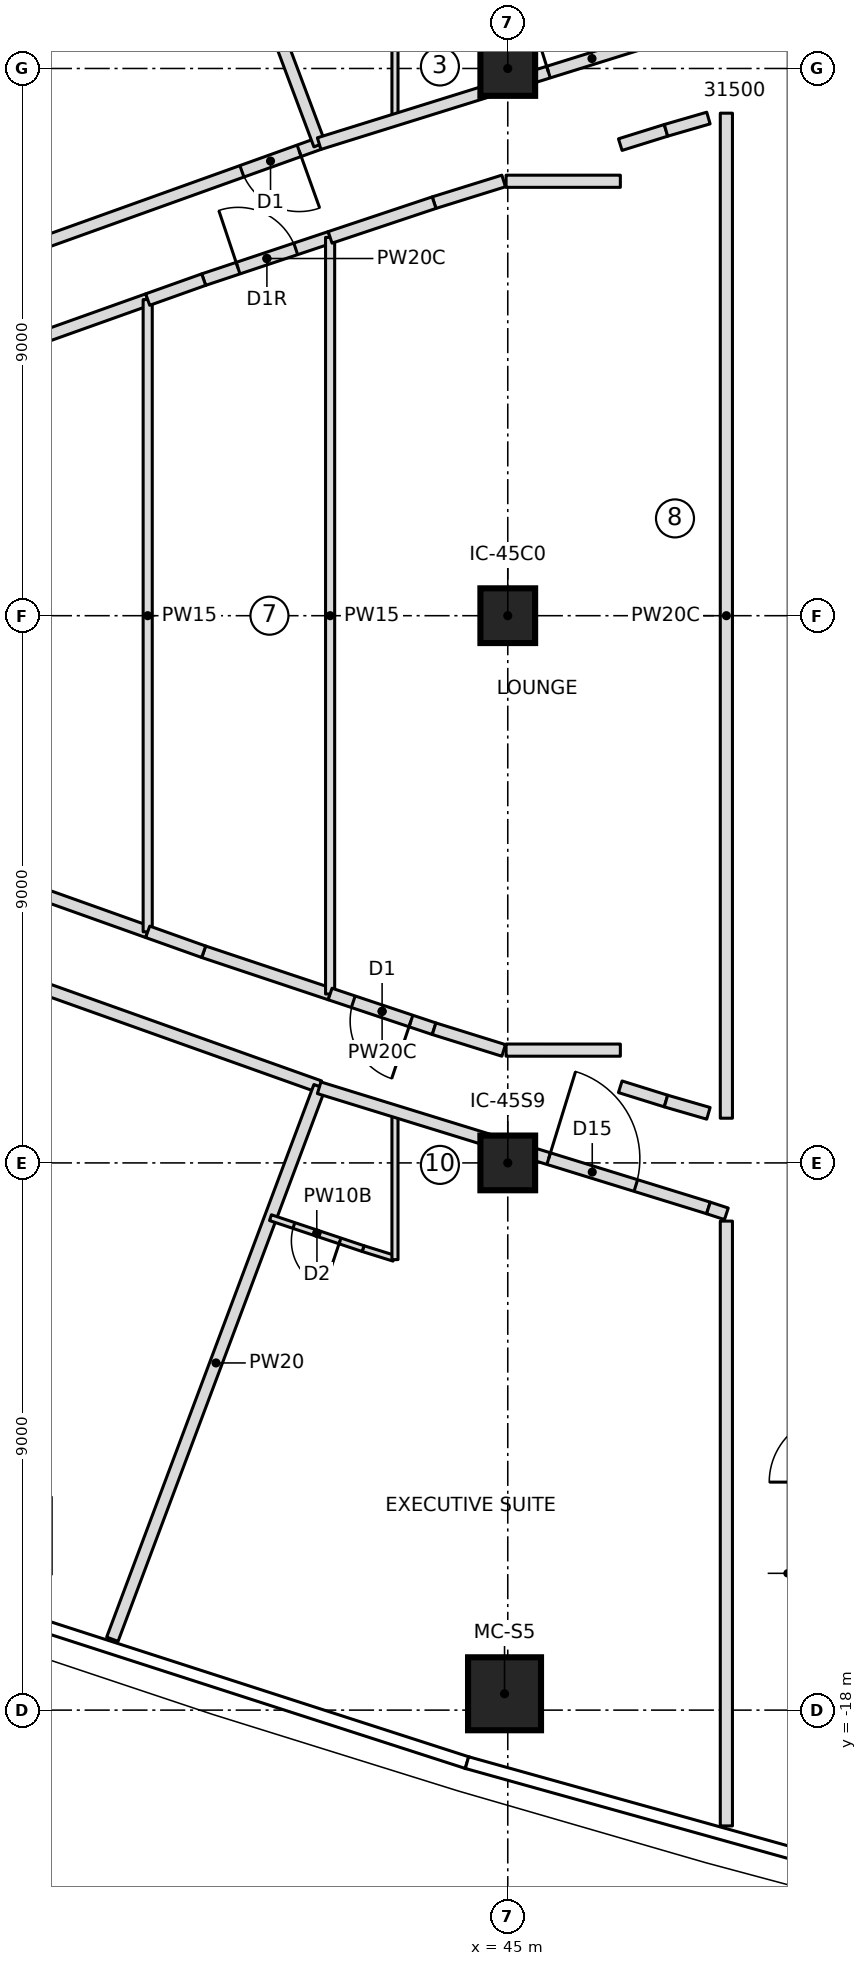
"""IFC4 building model, lengths in metres.
Left out: names, types, materials, properties, quantities, classifications, styles, units other than length and angle.
Written with IfcOpenShell. Run it as: python <this file> out.ifc"""

import sys

from ifc_helpers import new_model, si_unit, direction, frame, frame_2d, origin, origin_2d, place, context, subcontext, project, spatial, rectangle, extrude, element, fill, save


model = new_model("IFC4")
c1 = context("Model", 3, precision=1e-05, world=origin(), true_north=direction((0.0, 1.0)))
c2 = subcontext(c1, "Body", "Model", "MODEL_VIEW")
j1 = project(units=[si_unit("LENGTHUNIT", "METRE"), si_unit("PLANEANGLEUNIT", "RADIAN")], contexts=[c1])
p1 = place(None, origin())
s1 = spatial("IfcSite", under=j1, at=p1, CompositionType="ELEMENT")
p2 = place(p1, origin())
s2 = spatial("IfcBuilding", under=s1, at=p2, CompositionType="ELEMENT")
p3 = place(p2, frame((0.0, 0.0, 235.0)))
s3 = spatial("IfcBuildingStorey", under=s2, at=p3, CompositionType="ELEMENT", Elevation=235.0)
p4 = place(p3, frame((44.947, -17.731, 0.0), z_axis=(0.0, 0.0, 1.0), x_axis=(1.0, 0.0, 0.0)))
e1 = element("IfcColumn", 1, at=p4, inside=s3, PredefinedType="COLUMN", context=c2, shape_type="SweptSolid", body=[
    extrude(rectangle(XDim=1.2, YDim=1.2, at=origin_2d()), origin(), (0.0, 0.0, 1.0), 3.55),
])
for number, where, z_axis, x_axis in (
    (2, (45.0, -9.0, 0.0), (0.0, 0.0, 1.0), (1.0, 0.0, 0.0)),
    (3, (45.0, 0.0, 0.0), (0.0, 0.0, 1.0), (1.0, 0.0, 0.0)),
    (4, (45.0, 9.0, 0.0), (0.0, 0.0, 1.0), (1.0, 0.0, 0.0)),
):
    element("IfcColumn", number, at=place(p3, frame(where, z_axis=z_axis, x_axis=x_axis)), inside=s3, PredefinedType="COLUMN", context=c2, shape_type="SweptSolid", body=[
        extrude(rectangle(XDim=0.9, YDim=0.9, at=origin_2d()), origin(), (0.0, 0.0, 1.0), 3.55),
    ])
p5 = place(p3, frame((41.898, 7.764, 0.0), z_axis=(0.0, 0.0, 1.0), x_axis=(-0.941277643829, -0.337633525034, 0.0)))
e5 = element("IfcWall", 5, at=p5, inside=s3, PredefinedType="PARTITIONING", context=c2, shape_type="SweptSolid", body=[
    extrude(rectangle(XDim=10.001, YDim=0.2, at=frame_2d((5.0, 0.0))), origin(), (0.0, 0.0, 1.0), 3.25),
])
p6 = place(p5, frame((0.35, 0.0, 0.0)))
e6 = element("IfcOpeningElement", 6, at=p6, cuts=e5, PredefinedType="OPENING", context=c2, shape_type="SweptSolid", body=[
    extrude(rectangle(XDim=1.0, YDim=2.1, at=frame_2d((0.5, 1.05))), frame((0.0, 0.11, 0.0), z_axis=(0.0, -1.0, 0.0), x_axis=(1.0, 0.0, 0.0)), (0.0, 0.0, 1.0), 0.22),
])
p7 = place(p3, frame((41.906, 7.746, 0.0), z_axis=(0.0, 0.0, 1.0), x_axis=(-0.35112895446, 0.936327110224, 0.0)))
e7 = element("IfcWall", 7, at=p7, inside=s3, PredefinedType="PARTITIONING", context=c2, shape_type="SweptSolid", body=[
    extrude(rectangle(XDim=9.706, YDim=0.2, at=frame_2d((4.853, 0.0))), origin(), (0.0, 0.0, 1.0), 3.25),
])
p8 = place(p3, frame((32.485, -4.388, 0.0), z_axis=(0.0, 0.0, 1.0), x_axis=(0.941953797829, -0.335742524498, 0.0)))
e8 = element("IfcWall", 8, at=p8, inside=s3, PredefinedType="PARTITIONING", context=c2, shape_type="SweptSolid", body=[
    extrude(rectangle(XDim=10.001, YDim=0.2, at=frame_2d((5.001, 0.0))), origin(), (0.0, 0.0, 1.0), 3.25),
])
p9 = place(p8, frame((3.7, 0.0, 0.0)))
e9 = element("IfcOpeningElement", 9, at=p9, cuts=e8, PredefinedType="OPENING", context=c2, shape_type="SweptSolid", body=[
    extrude(rectangle(XDim=1.0, YDim=2.1, at=frame_2d((0.5, 1.05))), frame((0.0, 0.11, 0.0), z_axis=(0.0, -1.0, 0.0), x_axis=(1.0, 0.0, 0.0)), (0.0, 0.0, 1.0), 0.22),
])
p10 = place(p3, frame((38.497, -16.834, 0.0), z_axis=(0.0, 0.0, 1.0), x_axis=(0.35112895446, 0.936327110224, 0.0)))
e10 = element("IfcWall", 10, at=p10, inside=s3, PredefinedType="PARTITIONING", context=c2, shape_type="SweptSolid", body=[
    extrude(rectangle(XDim=9.706, YDim=0.2, at=frame_2d((4.853, 0.0))), origin(), (0.0, 0.0, 1.0), 3.25),
])
p11 = place(p3, frame((43.128, -10.568, 0.0), z_axis=(0.0, 0.0, 1.0), x_axis=(-0.954618903587, 0.297830067176, 0.0)))
e11 = element("IfcWall", 11, at=p11, inside=s3, PredefinedType="PARTITIONING", context=c2, shape_type="SweptSolid", body=[
    extrude(rectangle(XDim=0.531, YDim=0.1, at=frame_2d((0.266, 0.0))), origin(), (0.0, 0.0, 1.0), 3.25),
])
p12 = place(p3, frame((42.621, -10.409, 0.0), z_axis=(0.0, 0.0, 1.0), x_axis=(-0.948485479965, 0.3168206027, 0.0)))
e12 = element("IfcWall", 12, at=p12, inside=s3, PredefinedType="PARTITIONING", context=c2, shape_type="SweptSolid", body=[
    extrude(rectangle(XDim=1.606, YDim=0.1, at=frame_2d((0.803, 0.0))), origin(), (0.0, 0.0, 1.0), 3.25),
])
p13 = place(p12, frame((0.4, 0.0, 0.0)))
e13 = element("IfcOpeningElement", 13, at=p13, cuts=e12, PredefinedType="OPENING", context=c2, shape_type="SweptSolid", body=[
    extrude(rectangle(XDim=0.8, YDim=2.1, at=frame_2d((0.4, 1.05))), frame((0.0, 0.06, 0.0), z_axis=(0.0, -1.0, 0.0), x_axis=(1.0, 0.0, 0.0)), (0.0, 0.0, 1.0), 0.12),
])
for number, where, z_axis, x_axis in (
    (14, (39.078, -5.199, 0.0), (0.0, 0.0, 1.0), (-0.942, 0.336, 0.0)),
    (15, (36.236, 4.186, 0.0), (0.0, 0.0, 1.0), (0.942, 0.336, 0.0)),
):
    element("IfcWall", number, at=place(p3, frame(where, z_axis=z_axis, x_axis=x_axis)), inside=s3, PredefinedType="PARTITIONING", context=c2, shape_type="SweptSolid", body=[
        extrude(rectangle(XDim=3.017, YDim=0.2, at=frame_2d((1.509, 0.0))), origin(), (0.0, 0.0, 1.0), 3.25),
    ])
p14 = place(p3, frame((39.078, -5.199, 0.0), z_axis=(0.0, 0.0, 1.0), x_axis=(0.0, 1.0, 0.0)))
e16 = element("IfcWall", 16, at=p14, inside=s3, PredefinedType="PARTITIONING", context=c2, shape_type="SweptSolid", body=[
    extrude(rectangle(XDim=10.398, YDim=0.15, at=frame_2d((5.199, 0.0))), origin(), (0.0, 0.0, 1.0), 3.25),
])
p15 = place(p3, frame((39.999, 5.527, 0.0), z_axis=(0.0, 0.0, 1.0), x_axis=(0.9484714727, 0.316862534034, 0.0)))
e17 = element("IfcWall", 17, at=p15, inside=s3, PredefinedType="PARTITIONING", context=c2, shape_type="SweptSolid", body=[
    extrude(rectangle(XDim=2.192, YDim=0.2, at=frame_2d((1.096, 0.0))), origin(), (0.0, 0.0, 1.0), 3.25),
])
p16 = place(p15, frame((0.596, 0.0, 0.0)))
e18 = element("IfcOpeningElement", 18, at=p16, cuts=e17, PredefinedType="OPENING", context=c2, shape_type="SweptSolid", body=[
    extrude(rectangle(XDim=1.0, YDim=2.1, at=frame_2d((0.5, 1.05))), frame((0.0, 0.11, 0.0), z_axis=(0.0, -1.0, 0.0), x_axis=(1.0, 0.0, 0.0)), (0.0, 0.0, 1.0), 0.22),
])
p17 = place(p3, frame((42.078, -6.222, 0.0), z_axis=(0.0, 0.0, 1.0), x_axis=(-0.9484714727, 0.316862534034, 0.0)))
e19 = element("IfcWall", 19, at=p17, inside=s3, PredefinedType="PARTITIONING", context=c2, shape_type="SweptSolid", body=[
    extrude(rectangle(XDim=2.192, YDim=0.2, at=frame_2d((1.096, 0.0))), origin(), (0.0, 0.0, 1.0), 3.25),
])
for number, where, z_axis, x_axis in (
    (20, (39.999, -5.527, 0.0), (0.0, 0.0, 1.0), (-0.942, 0.336, 0.0)),
    (21, (39.078, 5.199, 0.0), (0.0, 0.0, 1.0), (0.942, 0.336, 0.0)),
):
    element("IfcWall", number, at=place(p3, frame(where, z_axis=z_axis, x_axis=x_axis)), inside=s3, PredefinedType="PARTITIONING", context=c2, shape_type="SweptSolid", body=[
        extrude(rectangle(XDim=0.978, YDim=0.2, at=frame_2d((0.489, 0.0))), origin(), (0.0, 0.0, 1.0), 3.25),
    ])
p18 = place(p3, frame((42.078, -6.222, 0.0), z_axis=(0.0, 0.0, 1.0), x_axis=(0.0, 1.0, 0.0)))
e22 = element("IfcWall", 22, at=p18, inside=s3, PredefinedType="PARTITIONING", context=c2, shape_type="SweptSolid", body=[
    extrude(rectangle(XDim=12.444, YDim=0.15, at=frame_2d((6.222, 0.0))), origin(), (0.0, 0.0, 1.0), 3.25),
])
p19 = place(p3, frame((43.788, -6.793, 0.0), z_axis=(0.0, 0.0, 1.0), x_axis=(-0.948466406859, 0.316877697323, 0.0)))
e23 = element("IfcWall", 23, at=p19, inside=s3, PredefinedType="PARTITIONING", context=c2, shape_type="SweptSolid", body=[
    extrude(rectangle(XDim=1.803, YDim=0.2, at=frame_2d((0.901, 0.0))), origin(), (0.0, 0.0, 1.0), 3.25),
])
p20 = place(p19, frame((0.402, 0.0, 0.0)))
e24 = element("IfcOpeningElement", 24, at=p20, cuts=e23, PredefinedType="OPENING", context=c2, shape_type="SweptSolid", body=[
    extrude(rectangle(XDim=1.0, YDim=2.1, at=frame_2d((0.5, 1.05))), frame((0.0, 0.11, 0.0), z_axis=(0.0, -1.0, 0.0), x_axis=(1.0, 0.0, 0.0)), (0.0, 0.0, 1.0), 0.22),
])
p21 = place(p3, frame((43.788, 6.793, 0.0), z_axis=(0.0, 0.0, 1.0), x_axis=(0.954693570678, 0.29759063511, 0.0)))
e25 = element("IfcWall", 25, at=p21, inside=s3, PredefinedType="PARTITIONING", context=c2, shape_type="SweptSolid", body=[
    extrude(rectangle(XDim=1.198, YDim=0.2, at=frame_2d((0.599, 0.0))), origin(), (0.0, 0.0, 1.0), 3.25),
])
for number, where, z_axis, x_axis in (
    (26, (46.85, 7.748, 0.0), (0.0, 0.0, 1.0), (0.955, 0.298, 0.0)),
    (27, (47.602, -7.982, 0.0), (0.0, 0.0, 1.0), (-0.955, 0.298, 0.0)),
):
    element("IfcWall", number, at=place(p3, frame(where, z_axis=z_axis, x_axis=x_axis)), inside=s3, PredefinedType="PARTITIONING", context=c2, shape_type="SweptSolid", body=[
        extrude(rectangle(XDim=0.788, YDim=0.2, at=frame_2d((0.394, 0.0))), origin(), (0.0, 0.0, 1.0), 3.25),
    ])
p22 = place(p3, frame((44.933, -7.15, 0.0), z_axis=(0.0, 0.0, 1.0), x_axis=(-0.954693570678, 0.29759063511, 0.0)))
e28 = element("IfcWall", 28, at=p22, inside=s3, PredefinedType="PARTITIONING", context=c2, shape_type="SweptSolid", body=[
    extrude(rectangle(XDim=1.198, YDim=0.2, at=frame_2d((0.599, 0.0))), origin(), (0.0, 0.0, 1.0), 3.25),
])
p23 = place(p3, frame((42.078, 6.222, 0.0), z_axis=(0.0, 0.0, 1.0), x_axis=(0.948466406859, 0.316877697323, 0.0)))
e29 = element("IfcWall", 29, at=p23, inside=s3, PredefinedType="PARTITIONING", context=c2, shape_type="SweptSolid", body=[
    extrude(rectangle(XDim=1.803, YDim=0.2, at=frame_2d((0.901, 0.0))), origin(), (0.0, 0.0, 1.0), 3.25),
])
for number, where, z_axis, x_axis in (
    (30, (43.145, 10.59, 0.0), (0.0, 0.0, 1.0), (0.0, -1.0, 0.0)),
    (31, (43.145, -8.165, 0.0), (0.0, 0.0, 1.0), (0.0, -1.0, 0.0)),
):
    element("IfcWall", number, at=place(p3, frame(where, z_axis=z_axis, x_axis=x_axis)), inside=s3, PredefinedType="PARTITIONING", context=c2, shape_type="SweptSolid", body=[
        extrude(rectangle(XDim=2.425, YDim=0.1, at=frame_2d((1.213, 0.0))), origin(), (0.0, 0.0, 1.0), 3.25),
    ])
p24 = place(p3, frame((41.898, 7.764, 0.0), z_axis=(0.0, 0.0, 1.0), x_axis=(0.954667015156, 0.297675813886, 0.0)))
e32 = element("IfcWall", 32, at=p24, inside=s3, PredefinedType="PARTITIONING", context=c2, shape_type="SweptSolid", body=[
    extrude(rectangle(XDim=6.706, YDim=0.2, at=frame_2d((3.353, 0.0))), origin(), (0.0, 0.0, 1.0), 3.25),
])
p25 = place(p24, frame((3.95, 0.0, 0.0)))
e33 = element("IfcOpeningElement", 33, at=p25, cuts=e32, PredefinedType="OPENING", context=c2, shape_type="SweptSolid", body=[
    extrude(rectangle(XDim=1.5, YDim=2.1, at=frame_2d((0.75, 1.05))), frame((0.0, 0.11, 0.0), z_axis=(0.0, -1.0, 0.0), x_axis=(1.0, 0.0, 0.0)), (0.0, 0.0, 1.0), 0.22),
])
p26 = place(p3, frame((41.898, -7.764, 0.0), z_axis=(0.0, 0.0, 1.0), x_axis=(0.955502033518, -0.294984514752, 0.0)))
e34 = element("IfcWall", 34, at=p26, inside=s3, PredefinedType="PARTITIONING", context=c2, shape_type="SweptSolid", body=[
    extrude(rectangle(XDim=6.7, YDim=0.2, at=frame_2d((3.35, 0.0))), origin(), (0.0, 0.0, 1.0), 3.25),
])
p27 = place(p26, frame((3.95, 0.0, 0.0)))
e35 = element("IfcOpeningElement", 35, at=p27, cuts=e34, PredefinedType="OPENING", context=c2, shape_type="SweptSolid", body=[
    extrude(rectangle(XDim=1.5, YDim=2.1, at=frame_2d((0.75, 1.05))), frame((0.0, 0.11, 0.0), z_axis=(0.0, -1.0, 0.0), x_axis=(1.0, 0.0, 0.0)), (0.0, 0.0, 1.0), 0.22),
])
for number, where, z_axis, x_axis in (
    (36, (47.602, 7.982, 0.0), (0.0, 0.0, 1.0), (0.96, 0.278, 0.0)),
    (37, (48.3, -8.185, 0.0), (0.0, 0.0, 1.0), (-0.96, 0.278, 0.0)),
):
    element("IfcWall", number, at=place(p3, frame(where, z_axis=z_axis, x_axis=x_axis)), inside=s3, PredefinedType="PARTITIONING", context=c2, shape_type="SweptSolid", body=[
        extrude(rectangle(XDim=0.727, YDim=0.2, at=frame_2d((0.363, 0.0))), origin(), (0.0, 0.0, 1.0), 3.25),
    ])
p28 = place(p3, frame((44.972, 7.145, 0.0), z_axis=(0.0, 0.0, 1.0), x_axis=(0.99999999156, 0.000129920747, 0.0)))
e38 = element("IfcWall", 38, at=p28, inside=s3, PredefinedType="PARTITIONING", context=c2, shape_type="SweptSolid", body=[
    extrude(rectangle(XDim=1.879, YDim=0.2, at=frame_2d((0.939, 0.0))), origin(), (0.0, 0.0, 1.0), 3.25),
])
p29 = place(p3, frame((48.595, 8.265, 0.0), z_axis=(0.0, 0.0, 1.0), x_axis=(0.0, -1.0, 0.0)))
e39 = element("IfcWall", 39, at=p29, inside=s3, PredefinedType="PARTITIONING", context=c2, shape_type="SweptSolid", body=[
    extrude(rectangle(XDim=16.53, YDim=0.2, at=frame_2d((8.265, 0.0))), origin(), (0.0, 0.0, 1.0), 3.25),
])
p30 = place(p3, frame((46.852, -7.145, 0.0), z_axis=(0.0, 0.0, 1.0), x_axis=(-0.99999999156, 0.000129920747, 0.0)))
e40 = element("IfcWall", 40, at=p30, inside=s3, PredefinedType="PARTITIONING", context=c2, shape_type="SweptSolid", body=[
    extrude(rectangle(XDim=1.879, YDim=0.2, at=frame_2d((0.939, 0.0))), origin(), (0.0, 0.0, 1.0), 3.25),
])
p31 = place(p3, frame((48.3, -9.741, 0.0), z_axis=(0.0, 0.0, 1.0), x_axis=(0.950709666312, -0.31008245739, 0.0)))
e41 = element("IfcWall", 41, at=p31, inside=s3, PredefinedType="PARTITIONING", context=c2, shape_type="SweptSolid", body=[
    extrude(rectangle(XDim=0.31, YDim=0.2, at=frame_2d((0.155, 0.0))), origin(), (0.0, 0.0, 1.0), 3.25),
])
p32 = place(p3, frame((48.595, -9.957, 0.0), z_axis=(0.0, 0.0, 1.0), x_axis=(0.0, -1.0, 0.0)))
e42 = element("IfcWall", 42, at=p32, inside=s3, PredefinedType="PARTITIONING", context=c2, shape_type="SweptSolid", body=[
    extrude(rectangle(XDim=9.947, YDim=0.2, at=frame_2d((4.974, 0.0))), origin(), (0.0, 0.0, 1.0), 3.25),
])
p33 = place(p6, origin())
e43 = element("IfcDoor", 43, at=p33, inside=s3, OperationType="SINGLE_SWING_LEFT", PredefinedType="DOOR", context=c2, shape_type="SweptSolid", body=[
    extrude(rectangle(XDim=1.0, YDim=2.1, at=frame_2d((0.5, 1.05))), frame((0.0, 0.025, 0.0), z_axis=(0.0, -1.0, 0.0), x_axis=(1.0, 0.0, 0.0)), (0.0, 0.0, 1.0), 0.05),
])
fill(e6, e43)
p34 = place(p25, origin())
e44 = element("IfcDoor", 44, at=p34, inside=s3, OperationType="DOUBLE_DOOR_SINGLE_SWING", PredefinedType="DOOR", context=c2, shape_type="SweptSolid", body=[
    extrude(rectangle(XDim=1.5, YDim=2.1, at=frame_2d((0.75, 1.05))), frame((0.0, 0.025, 0.0), z_axis=(0.0, -1.0, 0.0), x_axis=(1.0, 0.0, 0.0)), (0.0, 0.0, 1.0), 0.05),
])
fill(e33, e44)
p35 = place(p13, origin())
e45 = element("IfcDoor", 45, at=p35, inside=s3, OperationType="SINGLE_SWING_LEFT", PredefinedType="DOOR", context=c2, shape_type="SweptSolid", body=[
    extrude(rectangle(XDim=0.8, YDim=2.1, at=frame_2d((0.4, 1.05))), frame((0.0, 0.025, 0.0), z_axis=(0.0, -1.0, 0.0), x_axis=(1.0, 0.0, 0.0)), (0.0, 0.0, 1.0), 0.05),
])
fill(e13, e45)
p36 = place(p27, origin())
e46 = element("IfcDoor", 46, at=p36, inside=s3, OperationType="DOUBLE_DOOR_SINGLE_SWING", PredefinedType="DOOR", context=c2, shape_type="SweptSolid", body=[
    extrude(rectangle(XDim=1.5, YDim=2.1, at=frame_2d((0.75, 1.05))), frame((0.0, 0.025, 0.0), z_axis=(0.0, -1.0, 0.0), x_axis=(1.0, 0.0, 0.0)), (0.0, 0.0, 1.0), 0.05),
])
fill(e35, e46)
p37 = place(p16, origin())
e47 = element("IfcDoor", 47, at=p37, inside=s3, OperationType="SINGLE_SWING_RIGHT", PredefinedType="DOOR", context=c2, shape_type="SweptSolid", body=[
    extrude(rectangle(XDim=1.0, YDim=2.1, at=frame_2d((0.5, 1.05))), frame((0.0, 0.025, 0.0), z_axis=(0.0, -1.0, 0.0), x_axis=(1.0, 0.0, 0.0)), (0.0, 0.0, 1.0), 0.05),
])
fill(e18, e47)
p38 = place(p20, origin())
e48 = element("IfcDoor", 48, at=p38, inside=s3, OperationType="SINGLE_SWING_LEFT", PredefinedType="DOOR", context=c2, shape_type="SweptSolid", body=[
    extrude(rectangle(XDim=1.0, YDim=2.1, at=frame_2d((0.5, 1.05))), frame((0.0, 0.025, 0.0), z_axis=(0.0, -1.0, 0.0), x_axis=(1.0, 0.0, 0.0)), (0.0, 0.0, 1.0), 0.05),
])
fill(e24, e48)
save(model, sys.argv[1])
